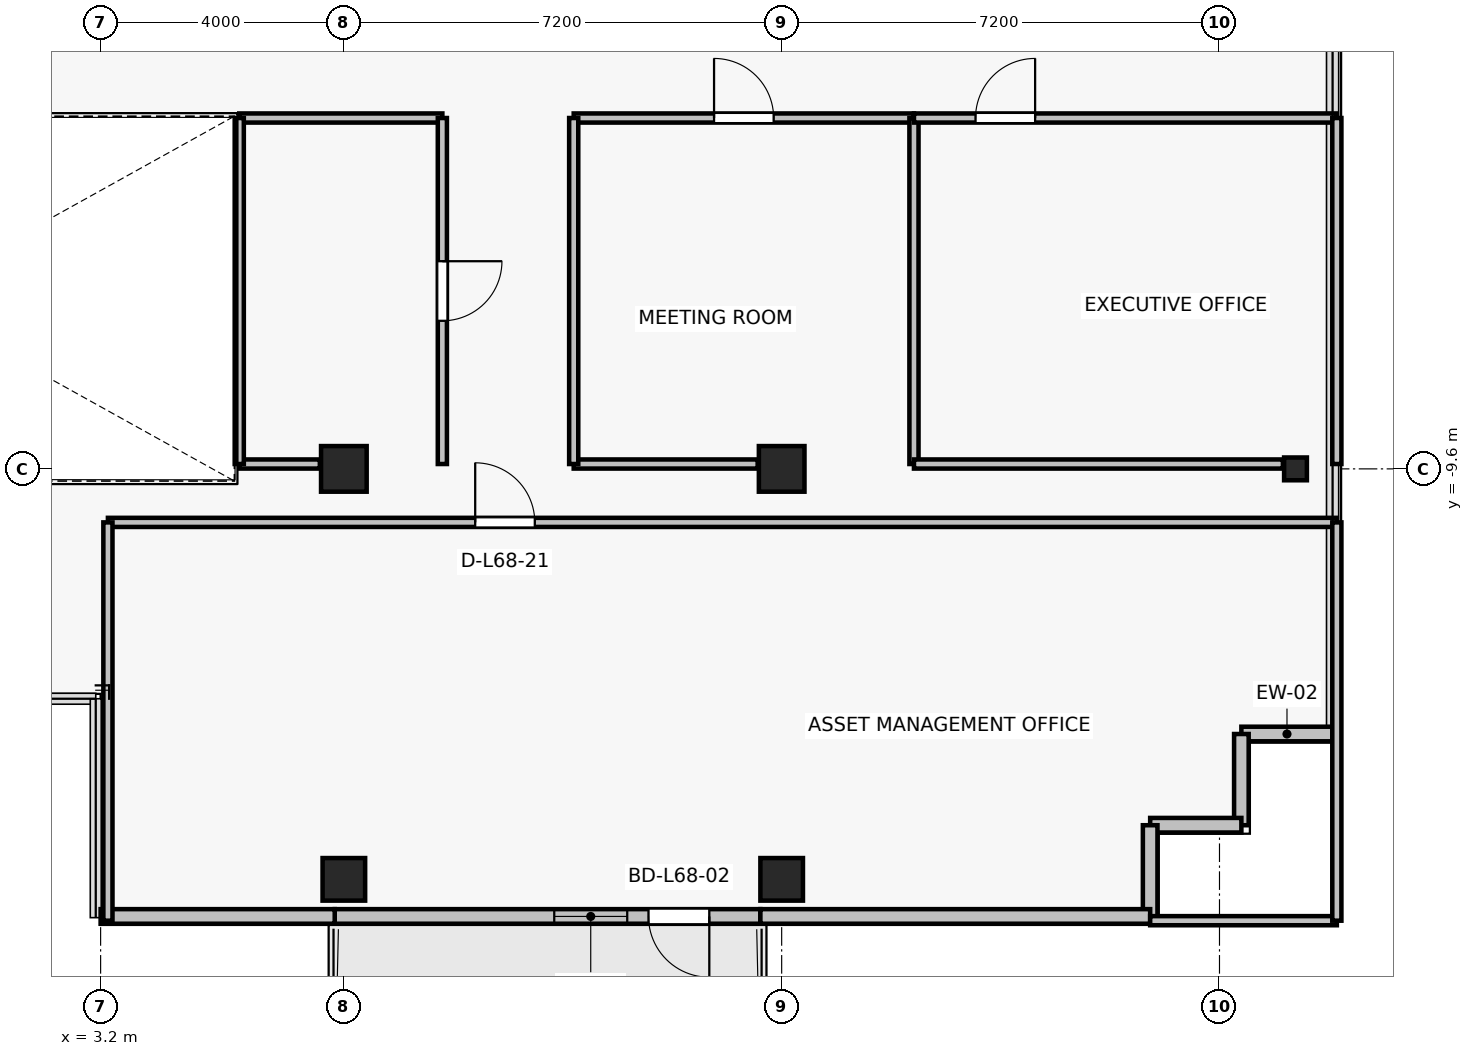
"""IFC4 building model, lengths in metres.
Left out: names, types, materials, properties, quantities, classifications, styles, units other than length and angle.
Written with IfcOpenShell. Run it as: python <this file> out.ifc"""

import sys

from ifc_helpers import new_model, si_unit, direction, frame, frame_2d, origin, origin_2d, place, context, subcontext, project, spatial, rectangle, i_section, extrude, source, transform, mapped, element, fill, save


model = new_model("IFC4")
c1 = context("Model", 3, precision=1e-05, world=origin(), true_north=direction((0.0, 1.0)))
c2 = subcontext(c1, "Body", "Model", "MODEL_VIEW")
j1 = project(units=[si_unit("LENGTHUNIT", "METRE"), si_unit("PLANEANGLEUNIT", "RADIAN")], contexts=[c1])
p1 = place(None, origin())
s1 = spatial("IfcSite", under=j1, at=p1, CompositionType="ELEMENT")
p2 = place(p1, origin())
s2 = spatial("IfcBuilding", under=s1, at=p2, CompositionType="ELEMENT")
p3 = place(p2, frame((0.0, 0.0, 241.9)))
s3 = spatial("IfcBuildingStorey", under=s2, at=p3, CompositionType="ELEMENT", Elevation=241.9)
for number, where, z_axis, x_axis in (
    (1, (7.2, -9.6, 0.0), (0.0, 0.0, 1.0), (1.0, 0.0, 0.0)),
    (2, (14.4, -9.6, 0.0), (0.0, 0.0, 1.0), (1.0, 0.0, 0.0)),
):
    element("IfcColumn", number, at=place(p3, frame(where, z_axis=z_axis, x_axis=x_axis)), inside=s3, PredefinedType="COLUMN", context=c2, shape_type="SweptSolid", body=[
        extrude(rectangle(XDim=0.75, YDim=0.75, at=origin_2d()), origin(), (0.0, 0.0, 1.0), 3.3),
    ])
for number, where, z_axis, x_axis in (
    (3, (7.2, -16.35, 0.0), (0.0, 0.0, 1.0), (1.0, 0.0, 0.0)),
    (4, (14.4, -16.35, 0.0), (0.0, 0.0, 1.0), (1.0, 0.0, 0.0)),
):
    element("IfcColumn", number, at=place(p3, frame(where, z_axis=z_axis, x_axis=x_axis)), inside=s3, PredefinedType="COLUMN", context=c2, shape_type="SweptSolid", body=[
        extrude(rectangle(XDim=0.7, YDim=0.7, at=origin_2d()), origin(), (0.0, 0.0, 1.0), 3.3),
    ])
p4 = place(p3, frame((22.85, -9.6, 0.0), z_axis=(0.0, 0.0, 1.0), x_axis=(1.0, 0.0, 0.0)))
e5 = element("IfcColumn", 5, at=p4, inside=s3, PredefinedType="COLUMN", context=c2, shape_type="SweptSolid", body=[
    extrude(i_section(OverallWidth=0.375, OverallDepth=0.375, WebThickness=0.017, FlangeThickness=0.027, FilletRadius=0.015, at=origin_2d()), origin(), (0.0, 0.0, 1.0), 3.3),
])
p5 = place(p3, frame((14.05, -16.96, 0.0), z_axis=(0.0, 0.0, 1.0), x_axis=(-1.0, 0.0, 0.0)))
e6 = element("IfcWall", 6, at=p5, inside=s3, PredefinedType="SOLIDWALL", context=c2, shape_type="SweptSolid", body=[
    extrude(rectangle(XDim=7.0, YDim=0.24, at=frame_2d((3.5, 0.0))), origin(), (0.0, 0.0, 1.0), 2.665),
])
p6 = place(p5, frame((0.84, 0.0, 0.0)))
e7 = element("IfcOpeningElement", 7, at=p6, cuts=e6, PredefinedType="OPENING", context=c2, shape_type="SweptSolid", body=[
    extrude(rectangle(XDim=1.0, YDim=2.2, at=frame_2d((0.5, 1.1))), frame((0.0, 0.13, 0.0), z_axis=(0.0, -1.0, 0.0), x_axis=(1.0, 0.0, 0.0)), (0.0, 0.0, 1.0), 0.26),
])
p7 = place(p5, frame((2.19, 0.0, 0.85)))
e8 = element("IfcOpeningElement", 8, at=p7, cuts=e6, PredefinedType="OPENING", context=c2, shape_type="SweptSolid", body=[
    extrude(rectangle(XDim=1.2, YDim=1.5, at=frame_2d((0.6, 0.75))), frame((0.0, 0.13, 0.0), z_axis=(0.0, -1.0, 0.0), x_axis=(1.0, 0.0, 0.0)), (0.0, 0.0, 1.0), 0.26),
])
for number, where, z_axis, x_axis in (
    (9, (21.96, -13.96, 0.0), (0.0, 0.0, 1.0), (1.0, 0.0, 0.0)),
    (10, (21.96, -15.46, 0.0), (0.0, 0.0, 1.0), (0.0, 1.0, 0.0)),
    (11, (20.46, -15.46, 0.0), (0.0, 0.0, 1.0), (1.0, 0.0, 0.0)),
    (12, (20.46, -16.96, 0.0), (0.0, 0.0, 1.0), (0.0, 1.0, 0.0)),
):
    element("IfcWall", number, at=place(p3, frame(where, z_axis=z_axis, x_axis=x_axis)), inside=s3, PredefinedType="SOLIDWALL", context=c2, shape_type="SweptSolid", body=[
        extrude(rectangle(XDim=1.5, YDim=0.24, at=frame_2d((0.75, 0.0))), origin(), (0.0, 0.0, 1.0), 3.075),
    ])
p8 = place(p3, frame((14.05, -16.96, 0.0), z_axis=(0.0, 0.0, 1.0), x_axis=(1.0, 0.0, 0.0)))
e13 = element("IfcWall", 13, at=p8, inside=s3, PredefinedType="SOLIDWALL", context=c2, shape_type="SweptSolid", body=[
    extrude(rectangle(XDim=6.41, YDim=0.24, at=frame_2d((3.205, 0.0))), origin(), (0.0, 0.0, 1.0), 3.075),
])
p9 = place(p3, frame((3.2, -16.96, 0.0), z_axis=(0.0, 0.0, 1.0), x_axis=(1.0, 0.0, 0.0)))
e14 = element("IfcWall", 14, at=p9, inside=s3, PredefinedType="SOLIDWALL", context=c2, shape_type="SweptSolid", body=[
    extrude(rectangle(XDim=3.85, YDim=0.24, at=frame_2d((1.925, 0.0))), origin(), (0.0, 0.0, 1.0), 3.075),
])
p10 = place(p3, frame((14.005, -9.52, 0.0), z_axis=(0.0, 0.0, 1.0), x_axis=(-1.0, 0.0, 0.0)))
e15 = element("IfcWall", 15, at=p10, inside=s3, PredefinedType="PARTITIONING", context=c2, shape_type="SweptSolid", body=[
    extrude(rectangle(XDim=3.025, YDim=0.15, at=frame_2d((1.512, 0.0))), origin(), (0.0, 0.0, 1.0), 2.615),
])
p11 = place(p3, frame((10.98, -3.83, 0.0), z_axis=(0.0, 0.0, 1.0), x_axis=(1.0, 0.0, 0.0)))
e16 = element("IfcWall", 16, at=p11, inside=s3, PredefinedType="PARTITIONING", context=c2, shape_type="SweptSolid", body=[
    extrude(rectangle(XDim=5.596, YDim=0.15, at=frame_2d((2.798, 0.0))), origin(), (0.0, 0.0, 1.0), 2.615),
])
p12 = place(p11, frame((2.308, 0.0, 0.0)))
e17 = element("IfcOpeningElement", 17, at=p12, cuts=e16, PredefinedType="OPENING", context=c2, shape_type="SweptSolid", body=[
    extrude(rectangle(XDim=0.98, YDim=2.15, at=frame_2d((0.49, 1.075))), frame((0.0, 0.085, 0.0), z_axis=(0.0, -1.0, 0.0), x_axis=(1.0, 0.0, 0.0)), (0.0, 0.0, 1.0), 0.17),
])
for number, where, z_axis, x_axis in (
    (18, (10.98, -9.52, 0.0), (0.0, 0.0, 1.0), (0.0, 1.0, 0.0)),
    (19, (16.576, -3.83, 0.0), (0.0, 0.0, 1.0), (0.0, -1.0, 0.0)),
):
    element("IfcWall", number, at=place(p3, frame(where, z_axis=z_axis, x_axis=x_axis)), inside=s3, PredefinedType="PARTITIONING", context=c2, shape_type="SweptSolid", body=[
        extrude(rectangle(XDim=5.69, YDim=0.15, at=frame_2d((2.845, 0.0))), origin(), (0.0, 0.0, 1.0), 2.615),
    ])
p13 = place(p3, frame((22.643, -9.52, 0.0), z_axis=(0.0, 0.0, 1.0), x_axis=(-1.0, 0.0, 0.0)))
e20 = element("IfcWall", 20, at=p13, inside=s3, PredefinedType="PARTITIONING", context=c2, shape_type="SweptSolid", body=[
    extrude(rectangle(XDim=6.067, YDim=0.15, at=frame_2d((3.033, 0.0))), origin(), (0.0, 0.0, 1.0), 2.615),
])
p14 = place(p3, frame((16.576, -3.83, 0.0), z_axis=(0.0, 0.0, 1.0), x_axis=(1.0, 0.0, 0.0)))
e21 = element("IfcWall", 21, at=p14, inside=s3, PredefinedType="PARTITIONING", context=c2, shape_type="SweptSolid", body=[
    extrude(rectangle(XDim=6.954, YDim=0.15, at=frame_2d((3.477, 0.0))), origin(), (0.0, 0.0, 1.0), 2.765),
])
p15 = place(p14, frame((1.012, 0.0, 0.0)))
e22 = element("IfcOpeningElement", 22, at=p15, cuts=e21, PredefinedType="OPENING", context=c2, shape_type="SweptSolid", body=[
    extrude(rectangle(XDim=0.98, YDim=2.15, at=frame_2d((0.49, 1.075))), frame((0.0, 0.085, 0.0), z_axis=(0.0, -1.0, 0.0), x_axis=(1.0, 0.0, 0.0)), (0.0, 0.0, 1.0), 0.17),
])
p16 = place(p3, frame((23.53, -3.83, 0.0), z_axis=(0.0, 0.0, 1.0), x_axis=(0.0, -1.0, 0.0)))
e23 = element("IfcWall", 23, at=p16, inside=s3, PredefinedType="PARTITIONING", context=c2, shape_type="SweptSolid", body=[
    extrude(rectangle(XDim=5.69, YDim=0.15, at=frame_2d((2.845, 0.0))), origin(), (0.0, 0.0, 1.0), 2.665),
])
p17 = place(p3, frame((23.53, -17.03, 0.0), z_axis=(0.0, 0.0, 1.0), x_axis=(-1.0, 0.0, 0.0)))
e24 = element("IfcWall", 24, at=p17, inside=s3, PredefinedType="PARTITIONING", context=c2, shape_type="SweptSolid", body=[
    extrude(rectangle(XDim=3.07, YDim=0.15, at=frame_2d((1.535, 0.0))), origin(), (0.0, 0.0, 1.0), 2.665),
])
p18 = place(p3, frame((3.32, -10.48, 0.0), z_axis=(0.0, 0.0, 1.0), x_axis=(1.0, 0.0, 0.0)))
e25 = element("IfcWall", 25, at=p18, inside=s3, PredefinedType="PARTITIONING", context=c2, shape_type="SweptSolid", body=[
    extrude(rectangle(XDim=20.21, YDim=0.15, at=frame_2d((10.105, 0.0))), origin(), (0.0, 0.0, 1.0), 2.615),
])
p19 = place(p18, frame((6.04, 0.0, 0.0)))
e26 = element("IfcOpeningElement", 26, at=p19, cuts=e25, PredefinedType="OPENING", context=c2, shape_type="SweptSolid", body=[
    extrude(rectangle(XDim=0.98, YDim=2.15, at=frame_2d((0.49, 1.075))), frame((0.0, 0.085, 0.0), z_axis=(0.0, -1.0, 0.0), x_axis=(1.0, 0.0, 0.0)), (0.0, 0.0, 1.0), 0.17),
])
p20 = place(p3, frame((3.32, -17.03, 0.0), z_axis=(0.0, 0.0, 1.0), x_axis=(0.0, 1.0, 0.0)))
e27 = element("IfcWall", 27, at=p20, inside=s3, PredefinedType="PARTITIONING", context=c2, shape_type="SweptSolid", body=[
    extrude(rectangle(XDim=6.55, YDim=0.15, at=frame_2d((3.275, 0.0))), origin(), (0.0, 0.0, 1.0), 2.615),
])
p21 = place(p3, frame((23.53, -10.48, 0.0), z_axis=(0.0, 0.0, 1.0), x_axis=(0.0, -1.0, 0.0)))
e28 = element("IfcWall", 28, at=p21, inside=s3, PredefinedType="PARTITIONING", context=c2, shape_type="SweptSolid", body=[
    extrude(rectangle(XDim=6.55, YDim=0.15, at=frame_2d((3.275, 0.0))), origin(), (0.0, 0.0, 1.0), 3.075),
])
p22 = place(p3, frame((6.805, -9.52, 0.0), z_axis=(0.0, 0.0, 1.0), x_axis=(-1.0, 0.0, 0.0)))
e29 = element("IfcWall", 29, at=p22, inside=s3, PredefinedType="PARTITIONING", context=c2, shape_type="SweptSolid", body=[
    extrude(rectangle(XDim=1.325, YDim=0.15, at=frame_2d((0.663, 0.0))), origin(), (0.0, 0.0, 1.0), 2.615),
])
p23 = place(p3, frame((5.48, -3.83, 0.0), z_axis=(0.0, 0.0, 1.0), x_axis=(1.0, 0.0, 0.0)))
e30 = element("IfcWall", 30, at=p23, inside=s3, PredefinedType="PARTITIONING", context=c2, shape_type="SweptSolid", body=[
    extrude(rectangle(XDim=3.34, YDim=0.15, at=frame_2d((1.67, 0.0))), origin(), (0.0, 0.0, 1.0), 2.615),
])
p24 = place(p3, frame((5.48, -9.52, 0.0), z_axis=(0.0, 0.0, 1.0), x_axis=(0.0, 1.0, 0.0)))
e31 = element("IfcWall", 31, at=p24, inside=s3, PredefinedType="PARTITIONING", context=c2, shape_type="SweptSolid", body=[
    extrude(rectangle(XDim=5.69, YDim=0.15, at=frame_2d((2.845, 0.0))), origin(), (0.0, 0.0, 1.0), 2.615),
])
p25 = place(p3, frame((8.82, -3.83, 0.0), z_axis=(0.0, 0.0, 1.0), x_axis=(0.0, -1.0, 0.0)))
e32 = element("IfcWall", 32, at=p25, inside=s3, PredefinedType="PARTITIONING", context=c2, shape_type="SweptSolid", body=[
    extrude(rectangle(XDim=5.69, YDim=0.15, at=frame_2d((2.845, 0.0))), origin(), (0.0, 0.0, 1.0), 2.615),
])
p26 = place(p25, frame((2.355, 0.0, 0.0)))
e33 = element("IfcOpeningElement", 33, at=p26, cuts=e32, PredefinedType="OPENING", context=c2, shape_type="SweptSolid", body=[
    extrude(rectangle(XDim=0.98, YDim=2.15, at=frame_2d((0.49, 1.075))), frame((0.0, 0.085, 0.0), z_axis=(0.0, -1.0, 0.0), x_axis=(1.0, 0.0, 0.0)), (0.0, 0.0, 1.0), 0.17),
])
m1 = source(origin(), c2, "Body", "SweptSolid", [
    extrude(rectangle(XDim=1.0, YDim=2.2, at=frame_2d((0.5, 1.1))), frame((0.0, 0.025, 0.0), z_axis=(0.0, -1.0, 0.0), x_axis=(1.0, 0.0, 0.0)), (0.0, 0.0, 1.0), 0.05),
])
p27 = place(p6, origin())
e34 = element("IfcDoor", 34, at=p27, inside=s3, OperationType="SINGLE_SWING_LEFT", PredefinedType="DOOR", context=c2, shape_type="MappedRepresentation", body=[
    mapped(m1, transform((0.0, 0.0, 0.0), x_axis=(1.0, 0.0, 0.0), y_axis=(0.0, 1.0, 0.0), z_axis=(0.0, 0.0, 1.0), scale=1.0)),
])
fill(e7, e34)
m2 = source(origin(), c2, "Body", "SweptSolid", [
    extrude(rectangle(XDim=1.2, YDim=1.5, at=frame_2d((0.6, 0.75))), frame((0.0, 0.03, 0.0), z_axis=(0.0, -1.0, 0.0), x_axis=(1.0, 0.0, 0.0)), (0.0, 0.0, 1.0), 0.06),
])
p28 = place(p7, origin())
e35 = element("IfcWindow", 35, at=p28, inside=s3, PartitioningType="SINGLE_PANEL", PredefinedType="WINDOW", context=c2, shape_type="MappedRepresentation", body=[
    mapped(m2, transform((0.0, 0.0, 0.0), x_axis=(1.0, 0.0, 0.0), y_axis=(0.0, 1.0, 0.0), z_axis=(0.0, 0.0, 1.0), scale=1.0)),
])
fill(e8, e35)
m3 = source(origin(), c2, "Body", "SweptSolid", [
    extrude(rectangle(XDim=0.98, YDim=2.15, at=frame_2d((0.49, 1.075))), frame((0.0, 0.025, 0.0), z_axis=(0.0, -1.0, 0.0), x_axis=(1.0, 0.0, 0.0)), (0.0, 0.0, 1.0), 0.05),
])
p29 = place(p12, origin())
e36 = element("IfcDoor", 36, at=p29, inside=s3, OperationType="SINGLE_SWING_LEFT", PredefinedType="DOOR", context=c2, shape_type="MappedRepresentation", body=[
    mapped(m3, transform((0.0, 0.0, 0.0), x_axis=(1.0, 0.0, 0.0), y_axis=(0.0, 1.0, 0.0), z_axis=(0.0, 0.0, 1.0), scale=1.0)),
])
fill(e17, e36)
p30 = place(p15, origin())
e37 = element("IfcDoor", 37, at=p30, inside=s3, OperationType="SINGLE_SWING_RIGHT", PredefinedType="DOOR", context=c2, shape_type="MappedRepresentation", body=[
    mapped(m3, transform((0.0, 0.0, 0.0), x_axis=(1.0, 0.0, 0.0), y_axis=(0.0, 1.0, 0.0), z_axis=(0.0, 0.0, 1.0), scale=1.0)),
])
fill(e22, e37)
p31 = place(p19, origin())
e38 = element("IfcDoor", 38, at=p31, inside=s3, OperationType="SINGLE_SWING_LEFT", PredefinedType="DOOR", context=c2, shape_type="MappedRepresentation", body=[
    mapped(m3, transform((0.0, 0.0, 0.0), x_axis=(1.0, 0.0, 0.0), y_axis=(0.0, 1.0, 0.0), z_axis=(0.0, 0.0, 1.0), scale=1.0)),
])
fill(e26, e38)
p32 = place(p26, origin())
e39 = element("IfcDoor", 39, at=p32, inside=s3, OperationType="SINGLE_SWING_LEFT", PredefinedType="DOOR", context=c2, shape_type="MappedRepresentation", body=[
    mapped(m3, transform((0.0, 0.0, 0.0), x_axis=(1.0, 0.0, 0.0), y_axis=(0.0, 1.0, 0.0), z_axis=(0.0, 0.0, 1.0), scale=1.0)),
])
fill(e33, e39)
save(model, sys.argv[1])
